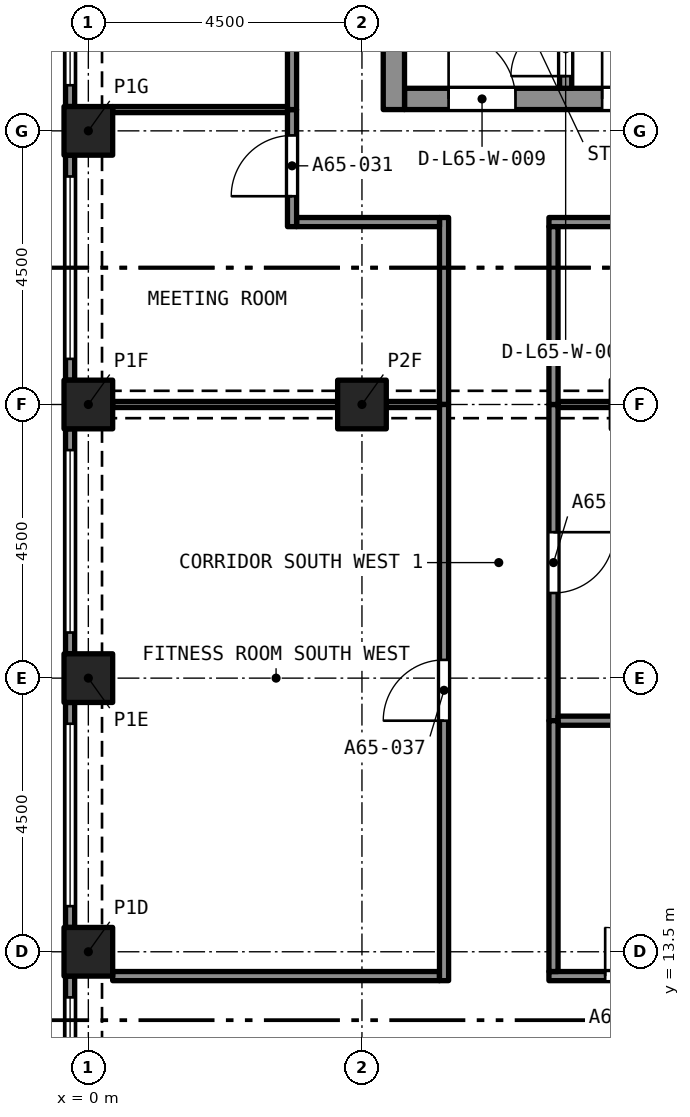
"""IFC4 building model, lengths in metres.
Left out: names, types, materials, properties, quantities, classifications, styles, units other than length and angle.
Written with IfcOpenShell. Run it as: python <this file> out.ifc"""

import sys

from ifc_helpers import new_model, si_unit, direction, frame, frame_2d, origin, origin_2d, place, context, subcontext, project, spatial, rectangle, extrude, element, fill, save


model = new_model("IFC4")
c1 = context("Model", 3, precision=1e-05, world=origin(), true_north=direction((0.0, 1.0)))
c2 = subcontext(c1, "Body", "Model", "MODEL_VIEW")
j1 = project(units=[si_unit("LENGTHUNIT", "METRE"), si_unit("PLANEANGLEUNIT", "RADIAN")], contexts=[c1])
p1 = place(None, origin())
s1 = spatial("IfcSite", under=j1, at=p1, CompositionType="ELEMENT")
p2 = place(p1, origin())
s2 = spatial("IfcBuilding", under=s1, at=p2, CompositionType="ELEMENT")
p3 = place(p2, frame((0.0, 0.0, 232.495)))
s3 = spatial("IfcBuildingStorey", under=s2, at=p3, CompositionType="ELEMENT", Elevation=232.495)
for number, where, z_axis, x_axis in (
    (1, (0.0, 13.5, 0.0), (0.0, 0.0, 1.0), (1.0, 0.0, 0.0)),
    (2, (0.0, 18.0, 0.0), (0.0, 0.0, 1.0), (1.0, 0.0, 0.0)),
    (3, (0.0, 22.5, 0.0), (0.0, 0.0, 1.0), (1.0, 0.0, 0.0)),
    (4, (4.5, 22.5, 0.0), (0.0, 0.0, 1.0), (1.0, 0.0, 0.0)),
    (5, (0.0, 27.0, 0.0), (0.0, 0.0, 1.0), (1.0, 0.0, 0.0)),
):
    element("IfcColumn", number, at=place(p3, frame(where, z_axis=z_axis, x_axis=x_axis)), inside=s3, PredefinedType="COLUMN", context=c2, shape_type="SweptSolid", body=[
        extrude(rectangle(XDim=0.8, YDim=0.8, at=origin_2d()), origin(), (0.0, 0.0, 1.0), 3.2),
    ])
p4 = place(p3, frame((5.2, 27.525, 0.0), z_axis=(0.0, 0.0, 1.0), x_axis=(1.0, 0.0, 0.0)))
e6 = element("IfcWall", 6, at=p4, inside=s3, PredefinedType="SOLIDWALL", context=c2, shape_type="SweptSolid", body=[
    extrude(rectangle(XDim=7.6, YDim=0.35, at=frame_2d((3.8, 0.0))), origin(), (0.0, 0.0, 1.0), 3.2),
])
p5 = place(p4, frame((0.725, 0.0, 0.0)))
e7 = element("IfcOpeningElement", 7, at=p5, cuts=e6, PredefinedType="OPENING", context=c2, shape_type="SweptSolid", body=[
    extrude(rectangle(XDim=1.1, YDim=2.1, at=frame_2d((0.55, 1.05))), frame((0.0, 0.185, 0.0), z_axis=(0.0, -1.0, 0.0), x_axis=(1.0, 0.0, 0.0)), (0.0, 0.0, 1.0), 0.37),
])
p6 = place(p4, frame((3.25, 0.0, 0.0)))
e8 = element("IfcOpeningElement", 8, at=p6, cuts=e6, PredefinedType="OPENING", context=c2, shape_type="SweptSolid", body=[
    extrude(rectangle(XDim=1.1, YDim=2.1, at=frame_2d((0.55, 1.05))), frame((0.0, 0.185, 0.0), z_axis=(0.0, -1.0, 0.0), x_axis=(1.0, 0.0, 0.0)), (0.0, 0.0, 1.0), 0.37),
])
p7 = place(p4, frame((5.775, 0.0, 0.0)))
e9 = element("IfcOpeningElement", 9, at=p7, cuts=e6, PredefinedType="OPENING", context=c2, shape_type="SweptSolid", body=[
    extrude(rectangle(XDim=1.1, YDim=2.1, at=frame_2d((0.55, 1.05))), frame((0.0, 0.185, 0.0), z_axis=(0.0, -1.0, 0.0), x_axis=(1.0, 0.0, 0.0)), (0.0, 0.0, 1.0), 0.37),
])
p8 = place(p3, frame((5.025, 27.35, 0.0), z_axis=(0.0, 0.0, 1.0), x_axis=(0.0, 1.0, 0.0)))
e10 = element("IfcWall", 10, at=p8, inside=s3, PredefinedType="SOLIDWALL", context=c2, shape_type="SweptSolid", body=[
    extrude(rectangle(XDim=12.8, YDim=0.35, at=frame_2d((6.4, 0.0))), origin(), (0.0, 0.0, 1.0), 3.2),
])
p9 = place(p8, frame((8.6, 0.0, 0.0)))
e11 = element("IfcOpeningElement", 11, at=p9, cuts=e10, PredefinedType="OPENING", context=c2, shape_type="SweptSolid", body=[
    extrude(rectangle(XDim=1.2, YDim=2.1, at=frame_2d((0.6, 1.05))), frame((0.0, 0.185, 0.0), z_axis=(0.0, -1.0, 0.0), x_axis=(1.0, 0.0, 0.0)), (0.0, 0.0, 1.0), 0.37),
])
p10 = place(p3, frame((-0.3, 27.4, 0.0), z_axis=(0.0, 0.0, 1.0), x_axis=(0.0, 1.0, 0.0)))
e12 = element("IfcWall", 12, at=p10, inside=s3, PredefinedType="SOLIDWALL", context=c2, shape_type="SweptSolid", body=[
    extrude(rectangle(XDim=3.7, YDim=0.15, at=frame_2d((1.85, 0.0))), origin(), (0.0, 0.0, 1.0), 3.2),
])
p11 = place(p10, frame((0.35, 0.0, 0.45)))
e13 = element("IfcOpeningElement", 13, at=p11, cuts=e12, PredefinedType="OPENING", context=c2, shape_type="SweptSolid", body=[
    extrude(rectangle(XDim=3.0, YDim=1.95, at=frame_2d((1.5, 0.975))), frame((0.0, 0.085, 0.0), z_axis=(0.0, -1.0, 0.0), x_axis=(1.0, 0.0, 0.0)), (0.0, 0.0, 1.0), 0.17),
])
p12 = place(p3, frame((-0.3, 22.9, 0.0), z_axis=(0.0, 0.0, 1.0), x_axis=(0.0, 1.0, 0.0)))
e14 = element("IfcWall", 14, at=p12, inside=s3, PredefinedType="SOLIDWALL", context=c2, shape_type="SweptSolid", body=[
    extrude(rectangle(XDim=3.7, YDim=0.15, at=frame_2d((1.85, 0.0))), origin(), (0.0, 0.0, 1.0), 3.2),
])
p13 = place(p12, frame((0.35, 0.0, 0.45)))
e15 = element("IfcOpeningElement", 15, at=p13, cuts=e14, PredefinedType="OPENING", context=c2, shape_type="SweptSolid", body=[
    extrude(rectangle(XDim=3.0, YDim=1.95, at=frame_2d((1.5, 0.975))), frame((0.0, 0.085, 0.0), z_axis=(0.0, -1.0, 0.0), x_axis=(1.0, 0.0, 0.0)), (0.0, 0.0, 1.0), 0.17),
])
p14 = place(p3, frame((-0.3, 18.4, 0.0), z_axis=(0.0, 0.0, 1.0), x_axis=(0.0, 1.0, 0.0)))
e16 = element("IfcWall", 16, at=p14, inside=s3, PredefinedType="SOLIDWALL", context=c2, shape_type="SweptSolid", body=[
    extrude(rectangle(XDim=3.7, YDim=0.15, at=frame_2d((1.85, 0.0))), origin(), (0.0, 0.0, 1.0), 3.2),
])
p15 = place(p14, frame((0.35, 0.0, 0.45)))
e17 = element("IfcOpeningElement", 17, at=p15, cuts=e16, PredefinedType="OPENING", context=c2, shape_type="SweptSolid", body=[
    extrude(rectangle(XDim=3.0, YDim=1.95, at=frame_2d((1.5, 0.975))), frame((0.0, 0.085, 0.0), z_axis=(0.0, -1.0, 0.0), x_axis=(1.0, 0.0, 0.0)), (0.0, 0.0, 1.0), 0.17),
])
p16 = place(p3, frame((-0.3, 13.9, 0.0), z_axis=(0.0, 0.0, 1.0), x_axis=(0.0, 1.0, 0.0)))
e18 = element("IfcWall", 18, at=p16, inside=s3, PredefinedType="SOLIDWALL", context=c2, shape_type="SweptSolid", body=[
    extrude(rectangle(XDim=3.7, YDim=0.15, at=frame_2d((1.85, 0.0))), origin(), (0.0, 0.0, 1.0), 3.2),
])
p17 = place(p16, frame((0.35, 0.0, 0.45)))
e19 = element("IfcOpeningElement", 19, at=p17, cuts=e18, PredefinedType="OPENING", context=c2, shape_type="SweptSolid", body=[
    extrude(rectangle(XDim=3.0, YDim=1.95, at=frame_2d((1.5, 0.975))), frame((0.0, 0.085, 0.0), z_axis=(0.0, -1.0, 0.0), x_axis=(1.0, 0.0, 0.0)), (0.0, 0.0, 1.0), 0.17),
])
p18 = place(p3, frame((-0.3, 9.4, 0.0), z_axis=(0.0, 0.0, 1.0), x_axis=(0.0, 1.0, 0.0)))
e20 = element("IfcWall", 20, at=p18, inside=s3, PredefinedType="SOLIDWALL", context=c2, shape_type="SweptSolid", body=[
    extrude(rectangle(XDim=3.7, YDim=0.15, at=frame_2d((1.85, 0.0))), origin(), (0.0, 0.0, 1.0), 3.2),
])
p19 = place(p18, frame((0.35, 0.0, 0.45)))
e21 = element("IfcOpeningElement", 21, at=p19, cuts=e20, PredefinedType="OPENING", context=c2, shape_type="SweptSolid", body=[
    extrude(rectangle(XDim=3.0, YDim=1.95, at=frame_2d((1.5, 0.975))), frame((0.0, 0.085, 0.0), z_axis=(0.0, -1.0, 0.0), x_axis=(1.0, 0.0, 0.0)), (0.0, 0.0, 1.0), 0.17),
])
p20 = place(p3, frame((7.65, 22.5, 0.0), z_axis=(0.0, 0.0, 1.0), x_axis=(0.0, -1.0, 0.0)))
e22 = element("IfcWall", 22, at=p20, inside=s3, PredefinedType="PARTITIONING", context=c2, shape_type="SweptSolid", body=[
    extrude(rectangle(XDim=5.2, YDim=0.15, at=frame_2d((2.6, 0.0))), origin(), (0.0, 0.0, 1.0), 2.85),
])
p21 = place(p20, frame((2.1, 0.0, 0.0)))
e23 = element("IfcOpeningElement", 23, at=p21, cuts=e22, PredefinedType="OPENING", context=c2, shape_type="SweptSolid", body=[
    extrude(rectangle(XDim=1.0, YDim=2.1, at=frame_2d((0.5, 1.05))), frame((0.0, 0.085, 0.0), z_axis=(0.0, -1.0, 0.0), x_axis=(1.0, 0.0, 0.0)), (0.0, 0.0, 1.0), 0.17),
])
p22 = place(p3, frame((7.725, 22.5, 0.0), z_axis=(0.0, 0.0, 1.0), x_axis=(1.0, 0.0, 0.0)))
e24 = element("IfcWall", 24, at=p22, inside=s3, PredefinedType="PARTITIONING", context=c2, shape_type="SweptSolid", body=[
    extrude(rectangle(XDim=0.875, YDim=0.1, at=frame_2d((0.438, 0.0))), origin(), (0.0, 0.0, 1.0), 2.38),
])
p23 = place(p3, frame((7.725, 17.3, 0.0), z_axis=(0.0, 0.0, 1.0), x_axis=(1.0, 0.0, 0.0)))
e25 = element("IfcWall", 25, at=p23, inside=s3, PredefinedType="PARTITIONING", context=c2, shape_type="SweptSolid", body=[
    extrude(rectangle(XDim=10.2, YDim=0.15, at=frame_2d((5.1, 0.0))), origin(), (0.0, 0.0, 1.0), 2.85),
])
p24 = place(p3, frame((7.575, 13.1, 0.0), z_axis=(0.0, 0.0, 1.0), x_axis=(1.0, 0.0, 0.0)))
e26 = element("IfcWall", 26, at=p24, inside=s3, PredefinedType="PARTITIONING", context=c2, shape_type="SweptSolid", body=[
    extrude(rectangle(XDim=2.575, YDim=0.15, at=frame_2d((1.288, 0.0))), origin(), (0.0, 0.0, 1.0), 2.85),
])
p25 = place(p24, frame((0.925, 0.0, 0.0)))
e27 = element("IfcOpeningElement", 27, at=p25, cuts=e26, PredefinedType="OPENING", context=c2, shape_type="SweptSolid", body=[
    extrude(rectangle(XDim=0.8, YDim=2.1, at=frame_2d((0.4, 1.05))), frame((0.0, 0.085, 0.0), z_axis=(0.0, -1.0, 0.0), x_axis=(1.0, 0.0, 0.0)), (0.0, 0.0, 1.0), 0.17),
])
p26 = place(p3, frame((0.4, 13.1, 0.0), z_axis=(0.0, 0.0, 1.0), x_axis=(1.0, 0.0, 0.0)))
e28 = element("IfcWall", 28, at=p26, inside=s3, PredefinedType="PARTITIONING", context=c2, shape_type="SweptSolid", body=[
    extrude(rectangle(XDim=5.375, YDim=0.15, at=frame_2d((2.688, 0.0))), origin(), (0.0, 0.0, 1.0), 2.85),
])
p27 = place(p3, frame((5.85, 22.5, 0.0), z_axis=(0.0, 0.0, 1.0), x_axis=(0.0, 1.0, 0.0)))
e29 = element("IfcWall", 29, at=p27, inside=s3, PredefinedType="PARTITIONING", context=c2, shape_type="SweptSolid", body=[
    extrude(rectangle(XDim=3.075, YDim=0.15, at=frame_2d((1.538, 0.0))), origin(), (0.0, 0.0, 1.0), 2.85),
])
p28 = place(p3, frame((3.425, 25.5, 0.0), z_axis=(0.0, 0.0, 1.0), x_axis=(1.0, 0.0, 0.0)))
e30 = element("IfcWall", 30, at=p28, inside=s3, PredefinedType="PARTITIONING", context=c2, shape_type="SweptSolid", body=[
    extrude(rectangle(XDim=2.35, YDim=0.15, at=frame_2d((1.175, 0.0))), origin(), (0.0, 0.0, 1.0), 2.85),
])
p29 = place(p3, frame((3.35, 25.425, 0.0), z_axis=(0.0, 0.0, 1.0), x_axis=(0.0, 1.0, 0.0)))
e31 = element("IfcWall", 31, at=p29, inside=s3, PredefinedType="PARTITIONING", context=c2, shape_type="SweptSolid", body=[
    extrude(rectangle(XDim=1.925, YDim=0.15, at=frame_2d((0.962, 0.0))), origin(), (0.0, 0.0, 1.0), 2.85),
])
p30 = place(p29, frame((0.5, 0.0, 0.0)))
e32 = element("IfcOpeningElement", 32, at=p30, cuts=e31, PredefinedType="OPENING", context=c2, shape_type="SweptSolid", body=[
    extrude(rectangle(XDim=1.0, YDim=2.1, at=frame_2d((0.5, 1.05))), frame((0.0, 0.085, 0.0), z_axis=(0.0, -1.0, 0.0), x_axis=(1.0, 0.0, 0.0)), (0.0, 0.0, 1.0), 0.17),
])
p31 = place(p3, frame((13.5, 25.5, 0.0), z_axis=(0.0, 0.0, 1.0), x_axis=(-1.0, 0.0, 0.0)))
e33 = element("IfcWall", 33, at=p31, inside=s3, PredefinedType="PARTITIONING", context=c2, shape_type="SweptSolid", body=[
    extrude(rectangle(XDim=5.925, YDim=0.15, at=frame_2d((2.962, 0.0))), origin(), (0.0, 0.0, 1.0), 2.85),
])
p32 = place(p31, frame((2.425, 0.0, 0.0)))
e34 = element("IfcOpeningElement", 34, at=p32, cuts=e33, PredefinedType="OPENING", context=c2, shape_type="SweptSolid", body=[
    extrude(rectangle(XDim=1.0, YDim=2.1, at=frame_2d((0.5, 1.05))), frame((0.0, 0.085, 0.0), z_axis=(0.0, -1.0, 0.0), x_axis=(1.0, 0.0, 0.0)), (0.0, 0.0, 1.0), 0.17),
])
p33 = place(p3, frame((7.65, 22.5, 0.0), z_axis=(0.0, 0.0, 1.0), x_axis=(0.0, 1.0, 0.0)))
e35 = element("IfcWall", 35, at=p33, inside=s3, PredefinedType="PARTITIONING", context=c2, shape_type="SweptSolid", body=[
    extrude(rectangle(XDim=2.925, YDim=0.15, at=frame_2d((1.462, 0.0))), origin(), (0.0, 0.0, 1.0), 2.85),
])
p34 = place(p3, frame((3.35, 27.35, 0.0), z_axis=(0.0, 0.0, 1.0), x_axis=(0.0, 1.0, 0.0)))
e36 = element("IfcWall", 36, at=p34, inside=s3, PredefinedType="PARTITIONING", context=c2, shape_type="SweptSolid", body=[
    extrude(rectangle(XDim=4.15, YDim=0.15, at=frame_2d((2.075, 0.0))), origin(), (0.0, 0.0, 1.0), 2.85),
])
p35 = place(p34, frame((1.575, 0.0, 0.0)))
e37 = element("IfcOpeningElement", 37, at=p35, cuts=e36, PredefinedType="OPENING", context=c2, shape_type="SweptSolid", body=[
    extrude(rectangle(XDim=1.0, YDim=2.1, at=frame_2d((0.5, 1.05))), frame((0.0, 0.085, 0.0), z_axis=(0.0, -1.0, 0.0), x_axis=(1.0, 0.0, 0.0)), (0.0, 0.0, 1.0), 0.17),
])
p36 = place(p3, frame((7.65, 13.175, 0.0), z_axis=(0.0, 0.0, 1.0), x_axis=(0.0, 1.0, 0.0)))
e38 = element("IfcWall", 38, at=p36, inside=s3, PredefinedType="PARTITIONING", context=c2, shape_type="SweptSolid", body=[
    extrude(rectangle(XDim=4.125, YDim=0.15, at=frame_2d((2.062, 0.0))), origin(), (0.0, 0.0, 1.0), 2.85),
])
p37 = place(p3, frame((5.85, 13.025, 0.0), z_axis=(0.0, 0.0, 1.0), x_axis=(0.0, 1.0, 0.0)))
e39 = element("IfcWall", 39, at=p37, inside=s3, PredefinedType="PARTITIONING", context=c2, shape_type="SweptSolid", body=[
    extrude(rectangle(XDim=9.475, YDim=0.15, at=frame_2d((4.738, 0.0))), origin(), (0.0, 0.0, 1.0), 2.85),
])
p38 = place(p37, frame((4.275, 0.0, 0.0)))
e40 = element("IfcOpeningElement", 40, at=p38, cuts=e39, PredefinedType="OPENING", context=c2, shape_type="SweptSolid", body=[
    extrude(rectangle(XDim=1.0, YDim=2.1, at=frame_2d((0.5, 1.05))), frame((0.0, 0.085, 0.0), z_axis=(0.0, -1.0, 0.0), x_axis=(1.0, 0.0, 0.0)), (0.0, 0.0, 1.0), 0.17),
])
p39 = place(p3, frame((0.4, 27.35, 0.0), z_axis=(0.0, 0.0, 1.0), x_axis=(1.0, 0.0, 0.0)))
e41 = element("IfcWall", 41, at=p39, inside=s3, PredefinedType="PARTITIONING", context=c2, shape_type="SweptSolid", body=[
    extrude(rectangle(XDim=2.875, YDim=0.1, at=frame_2d((1.438, 0.0))), origin(), (0.0, 0.0, 1.0), 2.85),
])
p40 = place(p3, frame((4.9, 22.5, 0.0), z_axis=(0.0, 0.0, 1.0), x_axis=(1.0, 0.0, 0.0)))
e42 = element("IfcWall", 42, at=p40, inside=s3, PredefinedType="PARTITIONING", context=c2, shape_type="SweptSolid", body=[
    extrude(rectangle(XDim=0.875, YDim=0.1, at=frame_2d((0.438, 0.0))), origin(), (0.0, 0.0, 1.0), 2.38),
])
p41 = place(p3, frame((0.4, 22.5, 0.0), z_axis=(0.0, 0.0, 1.0), x_axis=(1.0, 0.0, 0.0)))
e43 = element("IfcWall", 43, at=p41, inside=s3, PredefinedType="PARTITIONING", context=c2, shape_type="SweptSolid", body=[
    extrude(rectangle(XDim=3.7, YDim=0.1, at=frame_2d((1.85, 0.0))), origin(), (0.0, 0.0, 1.0), 2.38),
])
p42 = place(p3, frame((7.85, 27.7, 0.0), z_axis=(0.0, 0.0, 1.0), x_axis=(0.0, 1.0, 0.0)))
e44 = element("IfcWall", 44, at=p42, inside=s3, PredefinedType="SOLIDWALL", context=c2, shape_type="SweptSolid", body=[
    extrude(rectangle(XDim=5.4, YDim=0.2, at=frame_2d((2.7, 0.0))), origin(), (0.0, 0.0, 1.0), 2.85),
])
p43 = place(p42, frame((0.2, 0.0, 0.0)))
e45 = element("IfcOpeningElement", 45, at=p43, cuts=e44, PredefinedType="OPENING", context=c2, shape_type="SweptSolid", body=[
    extrude(rectangle(XDim=0.9, YDim=2.1, at=frame_2d((0.45, 1.05))), frame((0.0, 0.11, 0.0), z_axis=(0.0, -1.0, 0.0), x_axis=(1.0, 0.0, 0.0)), (0.0, 0.0, 1.0), 0.22),
])
p44 = place(p11, origin())
e46 = element("IfcWindow", 46, at=p44, inside=s3, PartitioningType="SINGLE_PANEL", PredefinedType="WINDOW", context=c2, shape_type="SweptSolid", body=[
    extrude(rectangle(XDim=3.0, YDim=1.95, at=frame_2d((1.5, 0.975))), frame((0.0, 0.03, 0.0), z_axis=(0.0, -1.0, 0.0), x_axis=(1.0, 0.0, 0.0)), (0.0, 0.0, 1.0), 0.06),
])
fill(e13, e46)
p45 = place(p13, origin())
e47 = element("IfcWindow", 47, at=p45, inside=s3, PartitioningType="SINGLE_PANEL", PredefinedType="WINDOW", context=c2, shape_type="SweptSolid", body=[
    extrude(rectangle(XDim=3.0, YDim=1.95, at=frame_2d((1.5, 0.975))), frame((0.0, 0.03, 0.0), z_axis=(0.0, -1.0, 0.0), x_axis=(1.0, 0.0, 0.0)), (0.0, 0.0, 1.0), 0.06),
])
fill(e15, e47)
p46 = place(p15, origin())
e48 = element("IfcWindow", 48, at=p46, inside=s3, PartitioningType="SINGLE_PANEL", PredefinedType="WINDOW", context=c2, shape_type="SweptSolid", body=[
    extrude(rectangle(XDim=3.0, YDim=1.95, at=frame_2d((1.5, 0.975))), frame((0.0, 0.03, 0.0), z_axis=(0.0, -1.0, 0.0), x_axis=(1.0, 0.0, 0.0)), (0.0, 0.0, 1.0), 0.06),
])
fill(e17, e48)
p47 = place(p17, origin())
e49 = element("IfcWindow", 49, at=p47, inside=s3, PartitioningType="SINGLE_PANEL", PredefinedType="WINDOW", context=c2, shape_type="SweptSolid", body=[
    extrude(rectangle(XDim=3.0, YDim=1.95, at=frame_2d((1.5, 0.975))), frame((0.0, 0.03, 0.0), z_axis=(0.0, -1.0, 0.0), x_axis=(1.0, 0.0, 0.0)), (0.0, 0.0, 1.0), 0.06),
])
fill(e19, e49)
p48 = place(p19, origin())
e50 = element("IfcWindow", 50, at=p48, inside=s3, PartitioningType="SINGLE_PANEL", PredefinedType="WINDOW", context=c2, shape_type="SweptSolid", body=[
    extrude(rectangle(XDim=3.0, YDim=1.95, at=frame_2d((1.5, 0.975))), frame((0.0, 0.03, 0.0), z_axis=(0.0, -1.0, 0.0), x_axis=(1.0, 0.0, 0.0)), (0.0, 0.0, 1.0), 0.06),
])
fill(e21, e50)
p49 = place(p21, origin())
e51 = element("IfcDoor", 51, at=p49, inside=s3, OperationType="SINGLE_SWING_RIGHT", PredefinedType="DOOR", context=c2, shape_type="SweptSolid", body=[
    extrude(rectangle(XDim=1.0, YDim=2.1, at=frame_2d((0.5, 1.05))), frame((0.0, 0.025, 0.0), z_axis=(0.0, -1.0, 0.0), x_axis=(1.0, 0.0, 0.0)), (0.0, 0.0, 1.0), 0.05),
])
fill(e23, e51)
p50 = place(p25, origin())
e52 = element("IfcDoor", 52, at=p50, inside=s3, OperationType="SINGLE_SWING_RIGHT", PredefinedType="DOOR", context=c2, shape_type="SweptSolid", body=[
    extrude(rectangle(XDim=0.8, YDim=2.1, at=frame_2d((0.4, 1.05))), frame((0.0, 0.025, 0.0), z_axis=(0.0, -1.0, 0.0), x_axis=(1.0, 0.0, 0.0)), (0.0, 0.0, 1.0), 0.05),
])
fill(e27, e52)
p51 = place(p30, origin())
e53 = element("IfcDoor", 53, at=p51, inside=s3, OperationType="SINGLE_SWING_RIGHT", PredefinedType="DOOR", context=c2, shape_type="SweptSolid", body=[
    extrude(rectangle(XDim=1.0, YDim=2.1, at=frame_2d((0.5, 1.05))), frame((0.0, 0.025, 0.0), z_axis=(0.0, -1.0, 0.0), x_axis=(1.0, 0.0, 0.0)), (0.0, 0.0, 1.0), 0.05),
])
fill(e32, e53)
p52 = place(p38, origin())
e54 = element("IfcDoor", 54, at=p52, inside=s3, OperationType="SINGLE_SWING_RIGHT", PredefinedType="DOOR", context=c2, shape_type="SweptSolid", body=[
    extrude(rectangle(XDim=1.0, YDim=2.1, at=frame_2d((0.5, 1.05))), frame((0.0, 0.025, 0.0), z_axis=(0.0, -1.0, 0.0), x_axis=(1.0, 0.0, 0.0)), (0.0, 0.0, 1.0), 0.05),
])
fill(e40, e54)
p53 = place(p43, origin())
e55 = element("IfcDoor", 55, at=p53, inside=s3, OperationType="SINGLE_SWING_LEFT", PredefinedType="DOOR", context=c2, shape_type="SweptSolid", body=[
    extrude(rectangle(XDim=0.9, YDim=2.1, at=frame_2d((0.45, 1.05))), frame((0.0, 0.025, 0.0), z_axis=(0.0, -1.0, 0.0), x_axis=(1.0, 0.0, 0.0)), (0.0, 0.0, 1.0), 0.05),
])
fill(e45, e55)
p54 = place(p5, origin())
e56 = element("IfcDoor", 56, at=p54, inside=s3, OperationType="SINGLE_SWING_LEFT", PredefinedType="DOOR", context=c2, shape_type="SweptSolid", body=[
    extrude(rectangle(XDim=1.1, YDim=2.1, at=frame_2d((0.55, 1.05))), frame((0.0, 0.025, 0.0), z_axis=(0.0, -1.0, 0.0), x_axis=(1.0, 0.0, 0.0)), (0.0, 0.0, 1.0), 0.05),
])
fill(e7, e56)
p55 = place(p6, origin())
e57 = element("IfcDoor", 57, at=p55, inside=s3, OperationType="SINGLE_SWING_LEFT", PredefinedType="DOOR", context=c2, shape_type="SweptSolid", body=[
    extrude(rectangle(XDim=1.1, YDim=2.1, at=frame_2d((0.55, 1.05))), frame((0.0, 0.025, 0.0), z_axis=(0.0, -1.0, 0.0), x_axis=(1.0, 0.0, 0.0)), (0.0, 0.0, 1.0), 0.05),
])
fill(e8, e57)
save(model, sys.argv[1])
